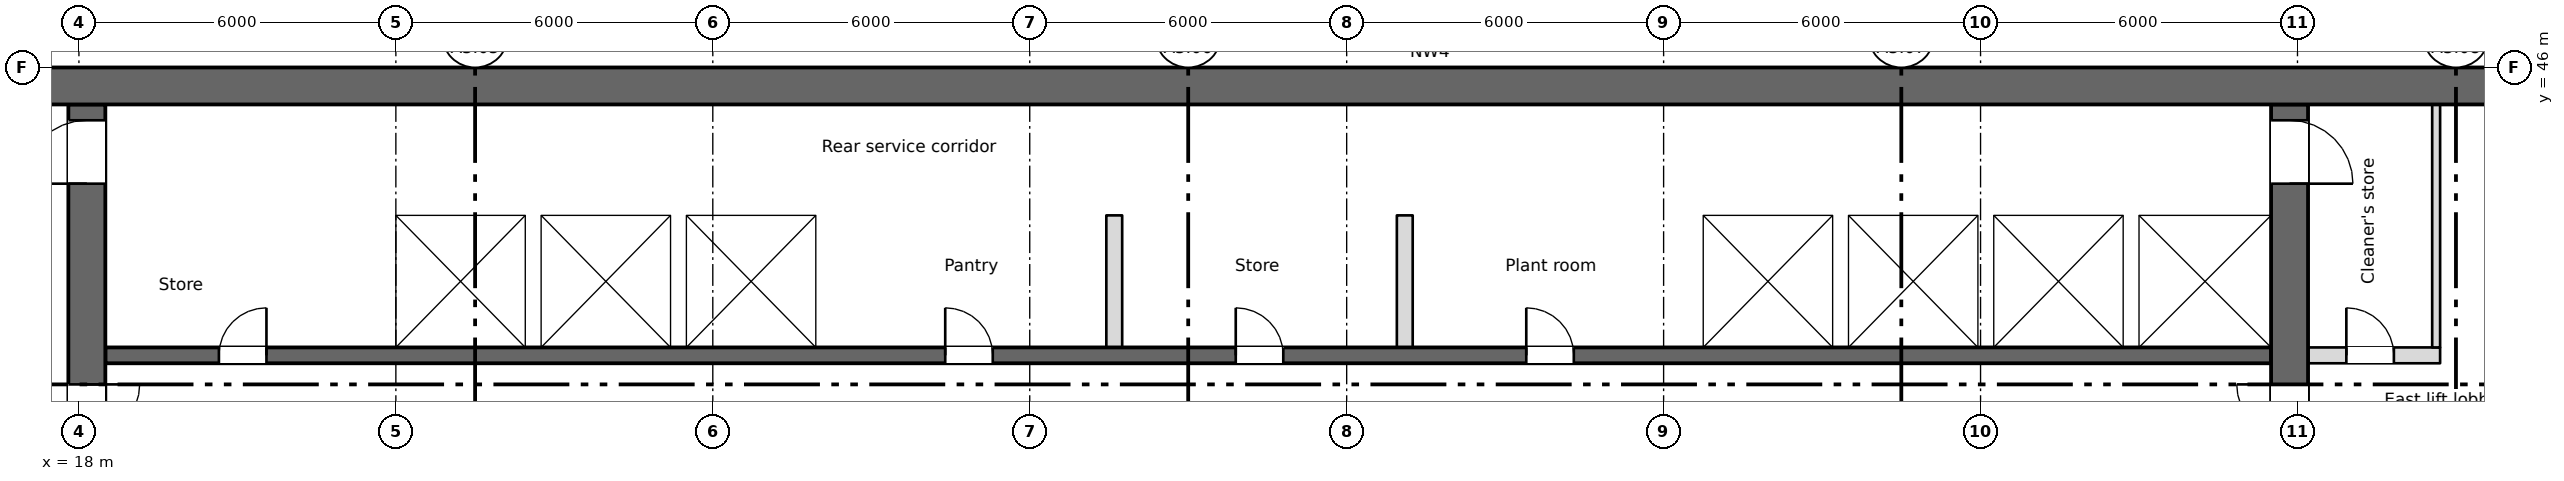
"""IFC4 building model, lengths in metres.
Left out: names, types, materials, properties, quantities, classifications, styles, units other than length and angle.
Written with IfcOpenShell. Run it as: python <this file> out.ifc"""

import sys

from ifc_helpers import new_model, si_unit, direction, frame, frame_2d, origin, place, context, subcontext, project, spatial, rectangle, extrude, element, fill, save


model = new_model("IFC4")
c1 = context("Model", 3, precision=1e-05, world=origin(), true_north=direction((0.0, 1.0)))
c2 = subcontext(c1, "Body", "Model", "MODEL_VIEW")
j1 = project(units=[si_unit("LENGTHUNIT", "METRE"), si_unit("PLANEANGLEUNIT", "RADIAN")], contexts=[c1])
p1 = place(None, origin())
s1 = spatial("IfcSite", under=j1, at=p1, CompositionType="ELEMENT")
p2 = place(p1, origin())
s2 = spatial("IfcBuilding", under=s1, at=p2, CompositionType="ELEMENT")
p3 = place(p2, frame((0.0, 0.0, 211.75)))
s3 = spatial("IfcBuildingStorey", under=s2, at=p3, CompositionType="ELEMENT", Elevation=211.75)
p4 = place(p3, frame((11.55, 45.65, 0.0), z_axis=(0.0, 0.0, 1.0), x_axis=(1.0, 0.0, 0.0)))
e1 = element("IfcWall", 1, at=p4, inside=s3, PredefinedType="SHEAR", context=c2, shape_type="SweptSolid", body=[
    extrude(rectangle(XDim=54.9, YDim=0.7, at=frame_2d((27.45, 0.0))), origin(), (0.0, 0.0, 1.0), 3.35),
])
p5 = place(p3, frame((18.15, 28.4, 0.0), z_axis=(0.0, 0.0, 1.0), x_axis=(0.0, 1.0, 0.0)))
e2 = element("IfcWall", 2, at=p5, inside=s3, PredefinedType="SHEAR", context=c2, shape_type="SweptSolid", body=[
    extrude(rectangle(XDim=16.9, YDim=0.7, at=frame_2d((8.45, 0.0))), origin(), (0.0, 0.0, 1.0), 3.35),
])
p6 = place(p5, frame((9.6, 0.0, 0.0)))
e3 = element("IfcOpeningElement", 3, at=p6, cuts=e2, PredefinedType="OPENING", context=c2, shape_type="SweptSolid", body=[
    extrude(rectangle(XDim=2.0, YDim=2.1, at=frame_2d((1.0, 1.05))), frame((0.0, 0.36, 0.0), z_axis=(0.0, -1.0, 0.0), x_axis=(1.0, 0.0, 0.0)), (0.0, 0.0, 1.0), 0.72),
])
p7 = place(p5, frame((15.4, 0.0, 0.0)))
e4 = element("IfcOpeningElement", 4, at=p7, cuts=e2, PredefinedType="OPENING", context=c2, shape_type="SweptSolid", body=[
    extrude(rectangle(XDim=1.2, YDim=2.1, at=frame_2d((0.6, 1.05))), frame((0.0, 0.36, 0.0), z_axis=(0.0, -1.0, 0.0), x_axis=(1.0, 0.0, 0.0)), (0.0, 0.0, 1.0), 0.72),
])
p8 = place(p3, frame((59.85, 28.4, 0.0), z_axis=(0.0, 0.0, 1.0), x_axis=(0.0, 1.0, 0.0)))
e5 = element("IfcWall", 5, at=p8, inside=s3, PredefinedType="SHEAR", context=c2, shape_type="SweptSolid", body=[
    extrude(rectangle(XDim=16.9, YDim=0.7, at=frame_2d((8.45, 0.0))), origin(), (0.0, 0.0, 1.0), 3.35),
])
p9 = place(p8, frame((9.6, 0.0, 0.0)))
e6 = element("IfcOpeningElement", 6, at=p9, cuts=e5, PredefinedType="OPENING", context=c2, shape_type="SweptSolid", body=[
    extrude(rectangle(XDim=2.0, YDim=2.1, at=frame_2d((1.0, 1.05))), frame((0.0, 0.36, 0.0), z_axis=(0.0, -1.0, 0.0), x_axis=(1.0, 0.0, 0.0)), (0.0, 0.0, 1.0), 0.72),
])
p10 = place(p8, frame((15.4, 0.0, 0.0)))
e7 = element("IfcOpeningElement", 7, at=p10, cuts=e5, PredefinedType="OPENING", context=c2, shape_type="SweptSolid", body=[
    extrude(rectangle(XDim=1.2, YDim=2.1, at=frame_2d((0.6, 1.05))), frame((0.0, 0.36, 0.0), z_axis=(0.0, -1.0, 0.0), x_axis=(1.0, 0.0, 0.0)), (0.0, 0.0, 1.0), 0.72),
])
p11 = place(p3, frame((18.5, 40.55, 0.0), z_axis=(0.0, 0.0, 1.0), x_axis=(1.0, 0.0, 0.0)))
e8 = element("IfcWall", 8, at=p11, inside=s3, PredefinedType="SHEAR", context=c2, shape_type="SweptSolid", body=[
    extrude(rectangle(XDim=41.0, YDim=0.3, at=frame_2d((20.5, 0.0))), origin(), (0.0, 0.0, 1.0), 3.35),
])
p12 = place(p11, frame((2.15, 0.0, 0.0)))
e9 = element("IfcOpeningElement", 9, at=p12, cuts=e8, PredefinedType="OPENING", context=c2, shape_type="SweptSolid", body=[
    extrude(rectangle(XDim=0.9, YDim=2.1, at=frame_2d((0.45, 1.05))), frame((0.0, 0.16, 0.0), z_axis=(0.0, -1.0, 0.0), x_axis=(1.0, 0.0, 0.0)), (0.0, 0.0, 1.0), 0.32),
])
p13 = place(p11, frame((15.9, 0.0, 0.0)))
e10 = element("IfcOpeningElement", 10, at=p13, cuts=e8, PredefinedType="OPENING", context=c2, shape_type="SweptSolid", body=[
    extrude(rectangle(XDim=0.9, YDim=2.1, at=frame_2d((0.45, 1.05))), frame((0.0, 0.16, 0.0), z_axis=(0.0, -1.0, 0.0), x_axis=(1.0, 0.0, 0.0)), (0.0, 0.0, 1.0), 0.32),
])
p14 = place(p11, frame((21.4, 0.0, 0.0)))
e11 = element("IfcOpeningElement", 11, at=p14, cuts=e8, PredefinedType="OPENING", context=c2, shape_type="SweptSolid", body=[
    extrude(rectangle(XDim=0.9, YDim=2.1, at=frame_2d((0.45, 1.05))), frame((0.0, 0.16, 0.0), z_axis=(0.0, -1.0, 0.0), x_axis=(1.0, 0.0, 0.0)), (0.0, 0.0, 1.0), 0.32),
])
p15 = place(p11, frame((26.9, 0.0, 0.0)))
e12 = element("IfcOpeningElement", 12, at=p15, cuts=e8, PredefinedType="OPENING", context=c2, shape_type="SweptSolid", body=[
    extrude(rectangle(XDim=0.9, YDim=2.1, at=frame_2d((0.45, 1.05))), frame((0.0, 0.16, 0.0), z_axis=(0.0, -1.0, 0.0), x_axis=(1.0, 0.0, 0.0)), (0.0, 0.0, 1.0), 0.32),
])
p16 = place(p11, frame((6.175, 0.0, 0.0)))
e13 = element("IfcOpeningElement", 13, at=p16, cuts=e8, PredefinedType="OPENING", context=c2, shape_type="SweptSolid", body=[
    extrude(rectangle(XDim=1.1, YDim=2.1, at=frame_2d((0.55, 1.05))), frame((0.0, 0.16, 0.0), z_axis=(0.0, -1.0, 0.0), x_axis=(1.0, 0.0, 0.0)), (0.0, 0.0, 1.0), 0.32),
])
p17 = place(p11, frame((8.925, 0.0, 0.0)))
e14 = element("IfcOpeningElement", 14, at=p17, cuts=e8, PredefinedType="OPENING", context=c2, shape_type="SweptSolid", body=[
    extrude(rectangle(XDim=1.1, YDim=2.1, at=frame_2d((0.55, 1.05))), frame((0.0, 0.16, 0.0), z_axis=(0.0, -1.0, 0.0), x_axis=(1.0, 0.0, 0.0)), (0.0, 0.0, 1.0), 0.32),
])
p18 = place(p11, frame((11.675, 0.0, 0.0)))
e15 = element("IfcOpeningElement", 15, at=p18, cuts=e8, PredefinedType="OPENING", context=c2, shape_type="SweptSolid", body=[
    extrude(rectangle(XDim=1.1, YDim=2.1, at=frame_2d((0.55, 1.05))), frame((0.0, 0.16, 0.0), z_axis=(0.0, -1.0, 0.0), x_axis=(1.0, 0.0, 0.0)), (0.0, 0.0, 1.0), 0.32),
])
p19 = place(p11, frame((30.925, 0.0, 0.0)))
e16 = element("IfcOpeningElement", 16, at=p19, cuts=e8, PredefinedType="OPENING", context=c2, shape_type="SweptSolid", body=[
    extrude(rectangle(XDim=1.1, YDim=2.1, at=frame_2d((0.55, 1.05))), frame((0.0, 0.16, 0.0), z_axis=(0.0, -1.0, 0.0), x_axis=(1.0, 0.0, 0.0)), (0.0, 0.0, 1.0), 0.32),
])
p20 = place(p11, frame((33.675, 0.0, 0.0)))
e17 = element("IfcOpeningElement", 17, at=p20, cuts=e8, PredefinedType="OPENING", context=c2, shape_type="SweptSolid", body=[
    extrude(rectangle(XDim=1.1, YDim=2.1, at=frame_2d((0.55, 1.05))), frame((0.0, 0.16, 0.0), z_axis=(0.0, -1.0, 0.0), x_axis=(1.0, 0.0, 0.0)), (0.0, 0.0, 1.0), 0.32),
])
p21 = place(p11, frame((36.375, 0.0, 0.0)))
e18 = element("IfcOpeningElement", 18, at=p21, cuts=e8, PredefinedType="OPENING", context=c2, shape_type="SweptSolid", body=[
    extrude(rectangle(XDim=1.2, YDim=2.1, at=frame_2d((0.6, 1.05))), frame((0.0, 0.16, 0.0), z_axis=(0.0, -1.0, 0.0), x_axis=(1.0, 0.0, 0.0)), (0.0, 0.0, 1.0), 0.32),
])
p22 = place(p11, frame((39.15, 0.0, 0.0)))
e19 = element("IfcOpeningElement", 19, at=p22, cuts=e8, PredefinedType="OPENING", context=c2, shape_type="SweptSolid", body=[
    extrude(rectangle(XDim=1.2, YDim=2.1, at=frame_2d((0.6, 1.05))), frame((0.0, 0.16, 0.0), z_axis=(0.0, -1.0, 0.0), x_axis=(1.0, 0.0, 0.0)), (0.0, 0.0, 1.0), 0.32),
])
p23 = place(p3, frame((18.5, 43.35, 0.0), z_axis=(0.0, 0.0, 1.0), x_axis=(1.0, 0.0, 0.0)))
e20 = element("IfcWall", 20, at=p23, inside=s3, PredefinedType="SHEAR", context=c2, shape_type="SweptSolid", body=[
    extrude(rectangle(XDim=41.0, YDim=0.3, at=frame_2d((20.5, 0.0))), origin(), (0.0, 0.0, 1.0), 3.35),
])
p24 = place(p3, frame((60.2, 40.55, 0.0), z_axis=(0.0, 0.0, 1.0), x_axis=(1.0, 0.0, 0.0)))
e21 = element("IfcWall", 21, at=p24, inside=s3, PredefinedType="PARTITIONING", context=c2, shape_type="SweptSolid", body=[
    extrude(rectangle(XDim=2.5, YDim=0.3, at=frame_2d((1.25, 0.0))), origin(), (0.0, 0.0, 1.0), 3.35),
])
p25 = place(p24, frame((0.725, 0.0, 0.0)))
e22 = element("IfcOpeningElement", 22, at=p25, cuts=e21, PredefinedType="OPENING", context=c2, shape_type="SweptSolid", body=[
    extrude(rectangle(XDim=0.9, YDim=2.1, at=frame_2d((0.45, 1.05))), frame((0.0, 0.16, 0.0), z_axis=(0.0, -1.0, 0.0), x_axis=(1.0, 0.0, 0.0)), (0.0, 0.0, 1.0), 0.32),
])
for number, where, z_axis, x_axis in (
    (23, (23.85, 40.7, 0.0), (0.0, 0.0, 1.0), (0.0, 1.0, 0.0)),
    (24, (26.6, 40.7, 0.0), (0.0, 0.0, 1.0), (0.0, 1.0, 0.0)),
    (25, (29.35, 40.7, 0.0), (0.0, 0.0, 1.0), (0.0, 1.0, 0.0)),
    (26, (32.1, 40.7, 0.0), (0.0, 0.0, 1.0), (0.0, 1.0, 0.0)),
    (27, (48.6, 40.7, 0.0), (0.0, 0.0, 1.0), (0.0, 1.0, 0.0)),
    (28, (51.35, 40.7, 0.0), (0.0, 0.0, 1.0), (0.0, 1.0, 0.0)),
    (29, (54.1, 40.7, 0.0), (0.0, 0.0, 1.0), (0.0, 1.0, 0.0)),
    (30, (56.85, 40.7, 0.0), (0.0, 0.0, 1.0), (0.0, 1.0, 0.0)),
):
    element("IfcWall", number, at=place(p3, frame(where, z_axis=z_axis, x_axis=x_axis)), inside=s3, PredefinedType="SHEAR", context=c2, shape_type="SweptSolid", body=[
        extrude(rectangle(XDim=2.5, YDim=0.3, at=frame_2d((1.25, 0.0))), origin(), (0.0, 0.0, 1.0), 3.35),
    ])
p26 = place(p3, frame((62.625, 40.7, 0.0), z_axis=(0.0, 0.0, 1.0), x_axis=(0.0, 1.0, 0.0)))
e31 = element("IfcWall", 31, at=p26, inside=s3, PredefinedType="PARTITIONING", context=c2, shape_type="SweptSolid", body=[
    extrude(rectangle(XDim=4.6, YDim=0.15, at=frame_2d((2.3, 0.0))), origin(), (0.0, 0.0, 1.0), 3.35),
])
for number, where, z_axis, x_axis in (
    (32, (37.6, 40.7, 0.0), (0.0, 0.0, 1.0), (0.0, 1.0, 0.0)),
    (33, (43.1, 40.7, 0.0), (0.0, 0.0, 1.0), (0.0, 1.0, 0.0)),
):
    element("IfcWall", number, at=place(p3, frame(where, z_axis=z_axis, x_axis=x_axis)), inside=s3, PredefinedType="PARTITIONING", context=c2, shape_type="SweptSolid", body=[
        extrude(rectangle(XDim=2.5, YDim=0.3, at=frame_2d((1.25, 0.0))), origin(), (0.0, 0.0, 1.0), 3.35),
    ])
p27 = place(p25, origin())
e34 = element("IfcDoor", 34, at=p27, inside=s3, OperationType="SINGLE_SWING_LEFT", PredefinedType="DOOR", context=c2, shape_type="SweptSolid", body=[
    extrude(rectangle(XDim=0.9, YDim=2.1, at=frame_2d((0.45, 1.05))), frame((0.0, 0.025, 0.0), z_axis=(0.0, -1.0, 0.0), x_axis=(1.0, 0.0, 0.0)), (0.0, 0.0, 1.0), 0.05),
])
fill(e22, e34)
p28 = place(p12, origin())
e35 = element("IfcDoor", 35, at=p28, inside=s3, OperationType="SINGLE_SWING_RIGHT", PredefinedType="DOOR", context=c2, shape_type="SweptSolid", body=[
    extrude(rectangle(XDim=0.9, YDim=2.1, at=frame_2d((0.45, 1.05))), frame((0.0, 0.025, 0.0), z_axis=(0.0, -1.0, 0.0), x_axis=(1.0, 0.0, 0.0)), (0.0, 0.0, 1.0), 0.05),
])
fill(e9, e35)
p29 = place(p13, origin())
e36 = element("IfcDoor", 36, at=p29, inside=s3, OperationType="SINGLE_SWING_LEFT", PredefinedType="DOOR", context=c2, shape_type="SweptSolid", body=[
    extrude(rectangle(XDim=0.9, YDim=2.1, at=frame_2d((0.45, 1.05))), frame((0.0, 0.025, 0.0), z_axis=(0.0, -1.0, 0.0), x_axis=(1.0, 0.0, 0.0)), (0.0, 0.0, 1.0), 0.05),
])
fill(e10, e36)
p30 = place(p14, origin())
e37 = element("IfcDoor", 37, at=p30, inside=s3, OperationType="SINGLE_SWING_LEFT", PredefinedType="DOOR", context=c2, shape_type="SweptSolid", body=[
    extrude(rectangle(XDim=0.9, YDim=2.1, at=frame_2d((0.45, 1.05))), frame((0.0, 0.025, 0.0), z_axis=(0.0, -1.0, 0.0), x_axis=(1.0, 0.0, 0.0)), (0.0, 0.0, 1.0), 0.05),
])
fill(e11, e37)
p31 = place(p15, origin())
e38 = element("IfcDoor", 38, at=p31, inside=s3, OperationType="SINGLE_SWING_LEFT", PredefinedType="DOOR", context=c2, shape_type="SweptSolid", body=[
    extrude(rectangle(XDim=0.9, YDim=2.1, at=frame_2d((0.45, 1.05))), frame((0.0, 0.025, 0.0), z_axis=(0.0, -1.0, 0.0), x_axis=(1.0, 0.0, 0.0)), (0.0, 0.0, 1.0), 0.05),
])
fill(e12, e38)
p32 = place(p16, origin())
e39 = element("IfcDoor", 39, at=p32, inside=s3, OperationType="SLIDING_TO_LEFT", PredefinedType="DOOR", context=c2, shape_type="SweptSolid", body=[
    extrude(rectangle(XDim=1.1, YDim=2.1, at=frame_2d((0.55, 1.05))), frame((0.0, 0.025, 0.0), z_axis=(0.0, -1.0, 0.0), x_axis=(1.0, 0.0, 0.0)), (0.0, 0.0, 1.0), 0.05),
])
fill(e13, e39)
p33 = place(p17, origin())
e40 = element("IfcDoor", 40, at=p33, inside=s3, OperationType="SLIDING_TO_LEFT", PredefinedType="DOOR", context=c2, shape_type="SweptSolid", body=[
    extrude(rectangle(XDim=1.1, YDim=2.1, at=frame_2d((0.55, 1.05))), frame((0.0, 0.025, 0.0), z_axis=(0.0, -1.0, 0.0), x_axis=(1.0, 0.0, 0.0)), (0.0, 0.0, 1.0), 0.05),
])
fill(e14, e40)
p34 = place(p18, origin())
e41 = element("IfcDoor", 41, at=p34, inside=s3, OperationType="SLIDING_TO_LEFT", PredefinedType="DOOR", context=c2, shape_type="SweptSolid", body=[
    extrude(rectangle(XDim=1.1, YDim=2.1, at=frame_2d((0.55, 1.05))), frame((0.0, 0.025, 0.0), z_axis=(0.0, -1.0, 0.0), x_axis=(1.0, 0.0, 0.0)), (0.0, 0.0, 1.0), 0.05),
])
fill(e15, e41)
p35 = place(p19, origin())
e42 = element("IfcDoor", 42, at=p35, inside=s3, OperationType="SLIDING_TO_LEFT", PredefinedType="DOOR", context=c2, shape_type="SweptSolid", body=[
    extrude(rectangle(XDim=1.1, YDim=2.1, at=frame_2d((0.55, 1.05))), frame((0.0, 0.025, 0.0), z_axis=(0.0, -1.0, 0.0), x_axis=(1.0, 0.0, 0.0)), (0.0, 0.0, 1.0), 0.05),
])
fill(e16, e42)
p36 = place(p20, origin())
e43 = element("IfcDoor", 43, at=p36, inside=s3, OperationType="SLIDING_TO_LEFT", PredefinedType="DOOR", context=c2, shape_type="SweptSolid", body=[
    extrude(rectangle(XDim=1.1, YDim=2.1, at=frame_2d((0.55, 1.05))), frame((0.0, 0.025, 0.0), z_axis=(0.0, -1.0, 0.0), x_axis=(1.0, 0.0, 0.0)), (0.0, 0.0, 1.0), 0.05),
])
fill(e17, e43)
p37 = place(p21, origin())
e44 = element("IfcDoor", 44, at=p37, inside=s3, OperationType="SLIDING_TO_LEFT", PredefinedType="DOOR", context=c2, shape_type="SweptSolid", body=[
    extrude(rectangle(XDim=1.2, YDim=2.1, at=frame_2d((0.6, 1.05))), frame((0.0, 0.025, 0.0), z_axis=(0.0, -1.0, 0.0), x_axis=(1.0, 0.0, 0.0)), (0.0, 0.0, 1.0), 0.05),
])
fill(e18, e44)
p38 = place(p22, origin())
e45 = element("IfcDoor", 45, at=p38, inside=s3, OperationType="SLIDING_TO_LEFT", PredefinedType="DOOR", context=c2, shape_type="SweptSolid", body=[
    extrude(rectangle(XDim=1.2, YDim=2.1, at=frame_2d((0.6, 1.05))), frame((0.0, 0.025, 0.0), z_axis=(0.0, -1.0, 0.0), x_axis=(1.0, 0.0, 0.0)), (0.0, 0.0, 1.0), 0.05),
])
fill(e19, e45)
p39 = place(p6, origin())
e46 = element("IfcDoor", 46, at=p39, inside=s3, OperationType="DOUBLE_DOOR_SINGLE_SWING", PredefinedType="DOOR", context=c2, shape_type="SweptSolid", body=[
    extrude(rectangle(XDim=2.0, YDim=2.1, at=frame_2d((1.0, 1.05))), frame((0.0, 0.025, 0.0), z_axis=(0.0, -1.0, 0.0), x_axis=(1.0, 0.0, 0.0)), (0.0, 0.0, 1.0), 0.05),
])
fill(e3, e46)
p40 = place(p9, origin())
e47 = element("IfcDoor", 47, at=p40, inside=s3, OperationType="DOUBLE_DOOR_SINGLE_SWING", PredefinedType="DOOR", context=c2, shape_type="SweptSolid", body=[
    extrude(rectangle(XDim=2.0, YDim=2.1, at=frame_2d((1.0, 1.05))), frame((0.0, 0.025, 0.0), z_axis=(0.0, -1.0, 0.0), x_axis=(1.0, 0.0, 0.0)), (0.0, 0.0, 1.0), 0.05),
])
fill(e6, e47)
p41 = place(p7, origin())
e48 = element("IfcDoor", 48, at=p41, inside=s3, OperationType="SINGLE_SWING_LEFT", PredefinedType="DOOR", context=c2, shape_type="SweptSolid", body=[
    extrude(rectangle(XDim=1.2, YDim=2.1, at=frame_2d((0.6, 1.05))), frame((0.0, 0.025, 0.0), z_axis=(0.0, -1.0, 0.0), x_axis=(1.0, 0.0, 0.0)), (0.0, 0.0, 1.0), 0.05),
])
fill(e4, e48)
p42 = place(p10, origin())
e49 = element("IfcDoor", 49, at=p42, inside=s3, OperationType="SINGLE_SWING_LEFT", PredefinedType="DOOR", context=c2, shape_type="SweptSolid", body=[
    extrude(rectangle(XDim=1.2, YDim=2.1, at=frame_2d((0.6, 1.05))), frame((0.0, 0.025, 0.0), z_axis=(0.0, -1.0, 0.0), x_axis=(1.0, 0.0, 0.0)), (0.0, 0.0, 1.0), 0.05),
])
fill(e7, e49)
save(model, sys.argv[1])
